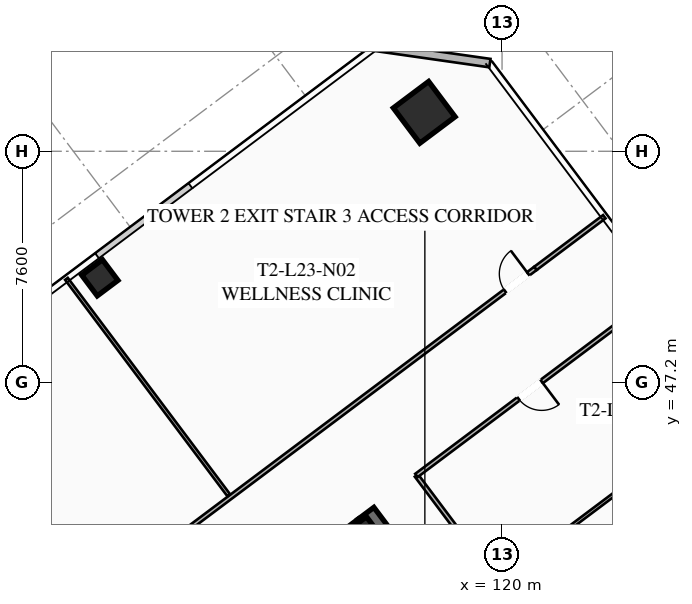
"""IFC4 building model, lengths in metres.
Left out: names, types, materials, properties, quantities, classifications, styles, units other than length and angle.
Written with IfcOpenShell. Run it as: python <this file> out.ifc"""

import sys

from ifc_helpers import new_model, si_unit, direction, frame, frame_2d, origin, origin_2d, place, context, subcontext, project, spatial, rectangle, hollow_rectangle, extrude, element, fill, save


model = new_model("IFC4")
c1 = context("Model", 3, precision=1e-05, world=origin(), true_north=direction((0.0, 1.0)))
c2 = subcontext(c1, "Body", "Model", "MODEL_VIEW")
j1 = project(units=[si_unit("LENGTHUNIT", "METRE"), si_unit("PLANEANGLEUNIT", "RADIAN")], contexts=[c1])
p1 = place(None, origin())
s1 = spatial("IfcSite", under=j1, at=p1, CompositionType="ELEMENT")
p2 = place(p1, origin())
s2 = spatial("IfcBuilding", under=s1, at=p2, CompositionType="ELEMENT")
p3 = place(p2, frame((0.0, 0.0, 88.5)))
s3 = spatial("IfcBuildingStorey", under=s2, at=p3, CompositionType="ELEMENT", Elevation=88.5)
p4 = place(p3, frame((115.524, 42.893, 0.0), z_axis=(0.0, 0.0, 1.0), x_axis=(0.600005007985, -0.799996243986, 0.0)))
e1 = element("IfcWall", 1, at=p4, inside=s3, PredefinedType="SHEAR", context=c2, shape_type="SweptSolid", body=[
    extrude(rectangle(XDim=15.6, YDim=0.65, at=frame_2d((7.8, 0.0))), origin(), (0.0, 0.0, 1.0), 3.55),
])
p5 = place(p3, frame((103.571, 33.522, 0.0), z_axis=(0.0, 0.0, 1.0), x_axis=(0.799998028465, 0.600002628705, 0.0)))
e2 = element("IfcWall", 2, at=p5, inside=s3, PredefinedType="SHEAR", context=c2, shape_type="SweptSolid", body=[
    extrude(rectangle(XDim=14.86, YDim=0.65, at=frame_2d((7.43, 0.0))), origin(), (0.0, 0.0, 1.0), 3.55),
])
p6 = place(p5, frame((4.48, 0.0, 0.0)))
e3 = element("IfcOpeningElement", 3, at=p6, cuts=e2, PredefinedType="OPENING", context=c2, shape_type="SweptSolid", body=[
    extrude(rectangle(XDim=1.25, YDim=2.25, at=frame_2d((0.625, 1.125))), frame((0.0, 0.335, 0.0), z_axis=(0.0, -1.0, 0.0), x_axis=(1.0, 0.0, 0.0)), (0.0, 0.0, 1.0), 0.67),
])
p7 = place(p5, frame((9.53, 0.0, 0.0)))
e4 = element("IfcOpeningElement", 4, at=p7, cuts=e2, PredefinedType="OPENING", context=c2, shape_type="SweptSolid", body=[
    extrude(rectangle(XDim=1.25, YDim=2.25, at=frame_2d((0.625, 1.125))), frame((0.0, 0.335, 0.0), z_axis=(0.0, -1.0, 0.0), x_axis=(1.0, 0.0, 0.0)), (0.0, 0.0, 1.0), 0.67),
])
p8 = place(p3, frame((115.41, 41.87, 0.0), z_axis=(0.0, 0.0, 1.0), x_axis=(0.799999996291, 0.600000004945, 0.0)))
e5 = element("IfcColumn", 5, at=p8, inside=s3, PredefinedType="COLUMN", context=c2, shape_type="SweptSolid", body=[
    extrude(hollow_rectangle(XDim=1.3, YDim=1.3, WallThickness=0.05, at=origin_2d()), origin(), (0.0, 0.0, 1.0), 3.35),
])
p9 = place(p3, frame((117.44, 56.08, 0.0), z_axis=(0.0, 0.0, 1.0), x_axis=(0.799999996291, 0.600000004945, 0.0)))
e6 = element("IfcColumn", 6, at=p9, inside=s3, PredefinedType="COLUMN", context=c2, shape_type="SweptSolid", body=[
    extrude(hollow_rectangle(XDim=1.45, YDim=1.45, WallThickness=0.055, at=origin_2d()), origin(), (0.0, 0.0, 1.0), 3.35),
])
p10 = place(p3, frame((106.77, 50.64, 0.0), z_axis=(0.0, 0.0, 1.0), x_axis=(0.799999996291, 0.600000004945, 0.0)))
e7 = element("IfcColumn", 7, at=p10, inside=s3, PredefinedType="COLUMN", context=c2, shape_type="SweptSolid", body=[
    extrude(hollow_rectangle(XDim=0.85, YDim=0.85, WallThickness=0.035, at=origin_2d()), origin(), (0.0, 0.0, 1.0), 3.35),
])
p11 = place(p3, frame((115.82, 58.24, 0.0), z_axis=(0.0, 0.0, 1.0), x_axis=(0.989948214866, -0.141430307517, 0.0)))
e8 = element("IfcWall", 8, at=p11, inside=s3, PredefinedType="SOLIDWALL", context=c2, shape_type="SweptSolid", body=[
    extrude(rectangle(XDim=3.818, YDim=0.28, at=frame_2d((1.909, 0.0))), origin(), (0.0, 0.0, 1.0), 3.35),
])
p12 = place(p3, frame((119.824, 40.618, 0.0), z_axis=(0.0, 0.0, 1.0), x_axis=(-0.599982243973, 0.800013316712, 0.0)))
e9 = element("IfcWall", 9, at=p12, inside=s3, PredefinedType="PARTITIONING", context=c2, shape_type="SweptSolid", body=[
    extrude(rectangle(XDim=4.4, YDim=0.135, at=frame_2d((2.2, 0.0))), origin(), (0.0, 0.0, 1.0), 2.703),
])
p13 = place(p3, frame((98.516, 34.012, 0.0), z_axis=(0.0, 0.0, 1.0), x_axis=(0.8, 0.6, 0.0)))
e10 = element("IfcWall", 10, at=p13, inside=s3, PredefinedType="PARTITIONING", context=c2, shape_type="SweptSolid", body=[
    extrude(rectangle(XDim=28.23, YDim=0.135, at=frame_2d((14.115, 0.0))), origin(), (0.0, 0.0, 1.0), 2.703),
])
p14 = place(p13, frame((0.3, 0.0, 0.0)))
e11 = element("IfcOpeningElement", 11, at=p14, cuts=e10, PredefinedType="OPENING", context=c2, shape_type="SweptSolid", body=[
    extrude(rectangle(XDim=0.95, YDim=2.05, at=frame_2d((0.475, 1.025))), frame((0.0, 0.077, 0.0), z_axis=(0.0, -1.0, 0.0), x_axis=(1.0, 0.0, 0.0)), (0.0, 0.0, 1.0), 0.155),
])
p15 = place(p13, frame((26.98, 0.0, 0.0)))
e12 = element("IfcOpeningElement", 12, at=p15, cuts=e10, PredefinedType="OPENING", context=c2, shape_type="SweptSolid", body=[
    extrude(rectangle(XDim=0.95, YDim=2.05, at=frame_2d((0.475, 1.025))), frame((0.0, 0.077, 0.0), z_axis=(0.0, -1.0, 0.0), x_axis=(1.0, 0.0, 0.0)), (0.0, 0.0, 1.0), 0.155),
])
p16 = place(p3, frame((121.1, 50.95, 0.0), z_axis=(0.0, 0.0, 1.0), x_axis=(0.799989647378, 0.600013803248, 0.0)))
e13 = element("IfcWall", 13, at=p16, inside=s3, PredefinedType="PARTITIONING", context=c2, shape_type="SweptSolid", body=[
    extrude(rectangle(XDim=2.83, YDim=0.135, at=frame_2d((1.415, 0.0))), origin(), (0.0, 0.0, 1.0), 2.703),
])
p17 = place(p3, frame((111.012, 43.484, 0.0), z_axis=(0.0, 0.0, 1.0), x_axis=(-0.599982443676, 0.800013166942, 0.0)))
e14 = element("IfcWall", 14, at=p17, inside=s3, PredefinedType="PARTITIONING", context=c2, shape_type="SweptSolid", body=[
    extrude(rectangle(XDim=8.9, YDim=0.11, at=frame_2d((4.45, 0.0))), origin(), (0.0, 0.0, 1.0), 2.703),
])
p18 = place(p3, frame((125.224, 50.168, 0.0), z_axis=(0.0, 0.0, 1.0), x_axis=(-0.8, -0.6, 0.0)))
e15 = element("IfcWall", 15, at=p18, inside=s3, PredefinedType="PARTITIONING", context=c2, shape_type="SweptSolid", body=[
    extrude(rectangle(XDim=10.05, YDim=0.135, at=frame_2d((5.025, 0.0))), origin(), (0.0, 0.0, 1.0), 2.703),
])
p19 = place(p18, frame((4.9, 0.0, 0.0)))
e16 = element("IfcOpeningElement", 16, at=p19, cuts=e15, PredefinedType="OPENING", context=c2, shape_type="SweptSolid", body=[
    extrude(rectangle(XDim=0.95, YDim=2.05, at=frame_2d((0.475, 1.025))), frame((0.0, 0.077, 0.0), z_axis=(0.0, -1.0, 0.0), x_axis=(1.0, 0.0, 0.0)), (0.0, 0.0, 1.0), 0.155),
])
p20 = place(p3, frame((127.864, 46.648, 0.0), z_axis=(0.0, 0.0, 1.0), x_axis=(-0.800007145523, -0.599990472518, 0.0)))
e17 = element("IfcWall", 17, at=p20, inside=s3, PredefinedType="PARTITIONING", context=c2, shape_type="SweptSolid", body=[
    extrude(rectangle(XDim=8.2, YDim=0.11, at=frame_2d((4.1, 0.0))), origin(), (0.0, 0.0, 1.0), 2.703),
])
p21 = place(p15, origin())
e18 = element("IfcDoor", 18, at=p21, inside=s3, OperationType="SINGLE_SWING_RIGHT", PredefinedType="DOOR", context=c2, shape_type="SweptSolid", body=[
    extrude(rectangle(XDim=0.95, YDim=2.05, at=frame_2d((0.475, 1.025))), frame((0.0, 0.025, 0.0), z_axis=(0.0, -1.0, 0.0), x_axis=(1.0, 0.0, 0.0)), (0.0, 0.0, 1.0), 0.05),
])
fill(e12, e18)
p22 = place(p19, origin())
e19 = element("IfcDoor", 19, at=p22, inside=s3, OperationType="SINGLE_SWING_LEFT", PredefinedType="DOOR", context=c2, shape_type="SweptSolid", body=[
    extrude(rectangle(XDim=0.95, YDim=2.05, at=frame_2d((0.475, 1.025))), frame((0.0, 0.025, 0.0), z_axis=(0.0, -1.0, 0.0), x_axis=(1.0, 0.0, 0.0)), (0.0, 0.0, 1.0), 0.05),
])
fill(e16, e19)
save(model, sys.argv[1])
